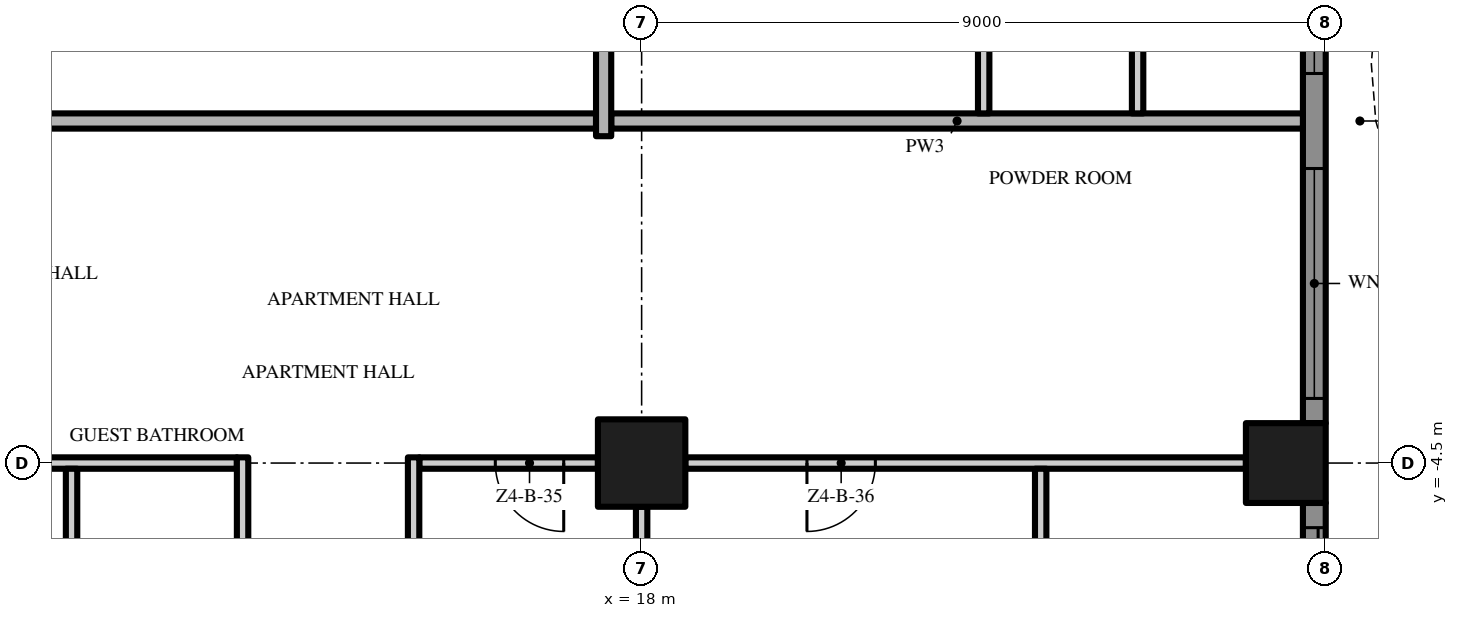
"""IFC4 building model, lengths in metres.
Left out: names, types, materials, properties, quantities, classifications, styles, units other than length and angle.
Written with IfcOpenShell. Run it as: python <this file> out.ifc"""

import sys

from ifc_helpers import new_model, si_unit, direction, frame, frame_2d, origin, origin_2d, place, context, subcontext, project, spatial, polyline, rectangle, outline, extrude, element, fill, save


model = new_model("IFC4")
c1 = context("Model", 3, precision=1e-05, world=origin(), true_north=direction((0.0, 1.0)))
c2 = subcontext(c1, "Body", "Model", "MODEL_VIEW")
j1 = project(units=[si_unit("LENGTHUNIT", "METRE"), si_unit("PLANEANGLEUNIT", "RADIAN")], contexts=[c1])
p1 = place(None, origin())
s1 = spatial("IfcSite", under=j1, at=p1, CompositionType="ELEMENT")
p2 = place(p1, origin())
s2 = spatial("IfcBuilding", under=s1, at=p2, CompositionType="ELEMENT")
p3 = place(p2, frame((0.0, 0.0, 195.8)))
s3 = spatial("IfcBuildingStorey", under=s2, at=p3, CompositionType="ELEMENT", Elevation=195.8)
p4 = place(p3, frame((18.0, -4.5, 0.0), z_axis=(0.0, 0.0, 1.0), x_axis=(1.0, 0.0, 0.0)))
e1 = element("IfcColumn", 1, at=p4, inside=s3, PredefinedType="COLUMN", context=c2, shape_type="SweptSolid", body=[
    extrude(rectangle(XDim=1.15, YDim=1.15, at=origin_2d()), origin(), (0.0, 0.0, 1.0), 3.5),
])
p5 = place(p3, frame((26.475, -4.5, 0.0), z_axis=(0.0, 0.0, 1.0), x_axis=(1.0, 0.0, 0.0)))
e2 = element("IfcColumn", 2, at=p5, inside=s3, PredefinedType="COLUMN", context=c2, shape_type="SweptSolid", body=[
    extrude(rectangle(XDim=1.05, YDim=1.05, at=origin_2d()), origin(), (0.0, 0.0, 1.0), 3.5),
])
p6 = place(p3, frame((26.85, -5.025, 0.0), z_axis=(0.0, 0.0, 1.0), x_axis=(0.0, -1.0, 0.0)))
e3 = element("IfcWall", 3, at=p6, inside=s3, PredefinedType="SOLIDWALL", context=c2, shape_type="SweptSolid", body=[
    extrude(rectangle(XDim=7.95, YDim=0.3, at=frame_2d((3.975, 0.0))), origin(), (0.0, 0.0, 1.0), 3.5),
])
p7 = place(p6, frame((4.6, 0.0, 0.45)))
e4 = element("IfcOpeningElement", 4, at=p7, cuts=e3, PredefinedType="OPENING", context=c2, shape_type="SweptSolid", body=[
    extrude(rectangle(XDim=3.025, YDim=2.65, at=frame_2d((1.512, 1.325))), frame((0.0, 0.16, 0.0), z_axis=(0.0, -1.0, 0.0), x_axis=(1.0, 0.0, 0.0)), (0.0, 0.0, 1.0), 0.32),
])
p8 = place(p6, frame((0.325, 0.0, 0.0)))
e5 = element("IfcOpeningElement", 5, at=p8, cuts=e3, PredefinedType="OPENING", context=c2, shape_type="SweptSolid", body=[
    extrude(rectangle(XDim=3.025, YDim=2.4, at=frame_2d((1.512, 1.2))), frame((0.0, 0.16, 0.0), z_axis=(0.0, -1.0, 0.0), x_axis=(1.0, 0.0, 0.0)), (0.0, 0.0, 1.0), 0.32),
])
p9 = place(p3, frame((26.85, 3.975, 0.0), z_axis=(0.0, 0.0, 1.0), x_axis=(0.0, -1.0, 0.0)))
e6 = element("IfcWall", 6, at=p9, inside=s3, PredefinedType="SOLIDWALL", context=c2, shape_type="SweptSolid", body=[
    extrude(rectangle(XDim=7.95, YDim=0.3, at=frame_2d((3.975, 0.0))), origin(), (0.0, 0.0, 1.0), 3.5),
])
p10 = place(p9, frame((4.6, 0.0, 0.45)))
e7 = element("IfcOpeningElement", 7, at=p10, cuts=e6, PredefinedType="OPENING", context=c2, shape_type="SweptSolid", body=[
    extrude(rectangle(XDim=3.025, YDim=2.65, at=frame_2d((1.512, 1.325))), frame((0.0, 0.16, 0.0), z_axis=(0.0, -1.0, 0.0), x_axis=(1.0, 0.0, 0.0)), (0.0, 0.0, 1.0), 0.32),
])
p11 = place(p9, frame((0.325, 0.0, 0.45)))
e8 = element("IfcOpeningElement", 8, at=p11, cuts=e6, PredefinedType="OPENING", context=c2, shape_type="SweptSolid", body=[
    extrude(rectangle(XDim=3.025, YDim=2.65, at=frame_2d((1.512, 1.325))), frame((0.0, 0.16, 0.0), z_axis=(0.0, -1.0, 0.0), x_axis=(1.0, 0.0, 0.0)), (0.0, 0.0, 1.0), 0.32),
])
p12 = place(p3, origin())
e9 = element("IfcWall", 9, at=p12, inside=s3, PredefinedType="USERDEFINED", context=c2, shape_type="SweptSolid", body=[
    extrude(outline(polyline([(28.8, -18.0), (28.095, -16.5), (27.659, -15.0), (27.6, -14.25), (27.659, -13.5), (28.095, -12.0), (28.8, -10.5), (29.505, -9.0), (29.941, -7.5), (30.0, -6.75), (29.941, -6.0), (29.505, -4.5), (28.8, -3.0), (28.095, -1.5), (27.659, 0.0), (27.6, 0.75), (27.659, 1.5), (28.095, 3.0), (28.8, 4.5), (29.505, 6.0), (29.941, 7.5), (30.0, 8.25), (29.941, 9.0), (29.505, 10.5), (28.8, 12.0), (28.095, 13.5), (27.659, 15.0), (27.6, 15.75), (27.659, 16.5), (28.095, 18.0), (27.855, 18.07), (27.411, 16.545), (27.349, 15.75), (27.411, 14.955), (27.86, 13.411), (28.574, 11.894), (29.271, 10.411), (29.694, 8.955), (29.749, 8.25), (29.694, 7.545), (29.271, 6.089), (28.574, 4.606), (27.86, 3.089), (27.411, 1.545), (27.349, 0.75), (27.411, -0.045), (27.86, -1.589), (28.574, -3.106), (29.271, -4.589), (29.694, -6.045), (29.749, -6.75), (29.694, -7.455), (29.271, -8.911), (28.574, -10.394), (27.86, -11.911), (27.411, -13.455), (27.349, -14.25), (27.411, -15.045), (27.86, -16.589), (28.574, -18.106), (28.8, -18.0)])), origin(), (0.0, 0.0, 1.0), 0.9),
])
p13 = place(p3, frame((9.575, -4.5, 0.0), z_axis=(0.0, 0.0, 1.0), x_axis=(1.0, 0.0, 0.0)))
e10 = element("IfcWall", 10, at=p13, inside=s3, PredefinedType="PARTITIONING", context=c2, shape_type="SweptSolid", body=[
    extrude(rectangle(XDim=3.1, YDim=0.15, at=frame_2d((1.55, 0.0))), origin(), (0.0, 0.0, 1.0), 3.5),
])
p14 = place(p3, frame((17.425, -4.5, 0.0), z_axis=(0.0, 0.0, 1.0), x_axis=(-1.0, 0.0, 0.0)))
e11 = element("IfcWall", 11, at=p14, inside=s3, PredefinedType="PARTITIONING", context=c2, shape_type="SweptSolid", body=[
    extrude(rectangle(XDim=2.35, YDim=0.15, at=frame_2d((1.175, 0.0))), origin(), (0.0, 0.0, 1.0), 3.5),
])
p15 = place(p14, frame((0.45, 0.0, 0.0)))
e12 = element("IfcOpeningElement", 12, at=p15, cuts=e11, PredefinedType="OPENING", context=c2, shape_type="SweptSolid", body=[
    extrude(rectangle(XDim=0.9, YDim=2.1, at=frame_2d((0.45, 1.05))), frame((0.0, 0.085, 0.0), z_axis=(0.0, -1.0, 0.0), x_axis=(1.0, 0.0, 0.0)), (0.0, 0.0, 1.0), 0.17),
])
p16 = place(p3, frame((25.95, -4.5, 0.0), z_axis=(0.0, 0.0, 1.0), x_axis=(-1.0, 0.0, 0.0)))
e13 = element("IfcWall", 13, at=p16, inside=s3, PredefinedType="PARTITIONING", context=c2, shape_type="SweptSolid", body=[
    extrude(rectangle(XDim=7.375, YDim=0.15, at=frame_2d((3.688, 0.0))), origin(), (0.0, 0.0, 1.0), 3.5),
])
p17 = place(p16, frame((4.875, 0.0, 0.0)))
e14 = element("IfcOpeningElement", 14, at=p17, cuts=e13, PredefinedType="OPENING", context=c2, shape_type="SweptSolid", body=[
    extrude(rectangle(XDim=0.9, YDim=2.1, at=frame_2d((0.45, 1.05))), frame((0.0, 0.085, 0.0), z_axis=(0.0, -1.0, 0.0), x_axis=(1.0, 0.0, 0.0)), (0.0, 0.0, 1.0), 0.17),
])
p18 = place(p3, frame((17.4, 0.0, 0.0), z_axis=(0.0, 0.0, 1.0), x_axis=(-1.0, 0.0, 0.0)))
e15 = element("IfcWall", 15, at=p18, inside=s3, PredefinedType="PARTITIONING", context=c2, shape_type="SweptSolid", body=[
    extrude(rectangle(XDim=17.3, YDim=0.2, at=frame_2d((8.65, 0.0))), origin(), (0.0, 0.0, 1.0), 3.5),
])
p19 = place(p18, frame((7.65, 0.0, 0.0)))
e16 = element("IfcOpeningElement", 16, at=p19, cuts=e15, PredefinedType="OPENING", context=c2, shape_type="SweptSolid", body=[
    extrude(rectangle(XDim=1.5, YDim=2.4, at=frame_2d((0.75, 1.2))), frame((0.0, 0.11, 0.0), z_axis=(0.0, -1.0, 0.0), x_axis=(1.0, 0.0, 0.0)), (0.0, 0.0, 1.0), 0.22),
])
p20 = place(p3, frame((17.6, 0.0, 0.0), z_axis=(0.0, 0.0, 1.0), x_axis=(1.0, 0.0, 0.0)))
e17 = element("IfcWall", 17, at=p20, inside=s3, PredefinedType="PARTITIONING", context=c2, shape_type="SweptSolid", body=[
    extrude(rectangle(XDim=9.1, YDim=0.2, at=frame_2d((4.55, 0.0))), origin(), (0.0, 0.0, 1.0), 3.5),
])
p21 = place(p3, frame((10.5, -8.925, 0.0), z_axis=(0.0, 0.0, 1.0), x_axis=(0.0, 1.0, 0.0)))
e18 = element("IfcWall", 18, at=p21, inside=s3, PredefinedType="PARTITIONING", context=c2, shape_type="SweptSolid", body=[
    extrude(rectangle(XDim=4.35, YDim=0.15, at=frame_2d((2.175, 0.0))), origin(), (0.0, 0.0, 1.0), 3.5),
])
p22 = place(p3, frame((12.75, -8.925, 0.0), z_axis=(0.0, 0.0, 1.0), x_axis=(0.0, 1.0, 0.0)))
e19 = element("IfcWall", 19, at=p22, inside=s3, PredefinedType="PARTITIONING", context=c2, shape_type="SweptSolid", body=[
    extrude(rectangle(XDim=4.5, YDim=0.15, at=frame_2d((2.25, 0.0))), origin(), (0.0, 0.0, 1.0), 3.5),
])
p23 = place(p22, frame((1.75, 0.0, 0.0)))
e20 = element("IfcOpeningElement", 20, at=p23, cuts=e19, PredefinedType="OPENING", context=c2, shape_type="SweptSolid", body=[
    extrude(rectangle(XDim=0.9, YDim=2.1, at=frame_2d((0.45, 1.05))), frame((0.0, 0.085, 0.0), z_axis=(0.0, -1.0, 0.0), x_axis=(1.0, 0.0, 0.0)), (0.0, 0.0, 1.0), 0.17),
])
p24 = place(p3, frame((15.0, -9.075, 0.0), z_axis=(0.0, 0.0, 1.0), x_axis=(0.0, 1.0, 0.0)))
e21 = element("IfcWall", 21, at=p24, inside=s3, PredefinedType="PARTITIONING", context=c2, shape_type="SweptSolid", body=[
    extrude(rectangle(XDim=4.65, YDim=0.15, at=frame_2d((2.325, 0.0))), origin(), (0.0, 0.0, 1.0), 3.5),
])
p25 = place(p3, frame((17.5, -0.2, 0.0), z_axis=(0.0, 0.0, 1.0), x_axis=(0.0, 1.0, 0.0)))
e22 = element("IfcWall", 22, at=p25, inside=s3, PredefinedType="PARTITIONING", context=c2, shape_type="SweptSolid", body=[
    extrude(rectangle(XDim=4.125, YDim=0.2, at=frame_2d((2.062, 0.0))), origin(), (0.0, 0.0, 1.0), 3.5),
])
p26 = place(p3, frame((18.0, -8.925, 0.0), z_axis=(0.0, 0.0, 1.0), x_axis=(0.0, 1.0, 0.0)))
e23 = element("IfcWall", 23, at=p26, inside=s3, PredefinedType="PARTITIONING", context=c2, shape_type="SweptSolid", body=[
    extrude(rectangle(XDim=3.85, YDim=0.15, at=frame_2d((1.925, 0.0))), origin(), (0.0, 0.0, 1.0), 3.5),
])
p27 = place(p3, frame((22.5, 17.475, 0.0), z_axis=(0.0, 0.0, 1.0), x_axis=(0.0, -1.0, 0.0)))
e24 = element("IfcWall", 24, at=p27, inside=s3, PredefinedType="PARTITIONING", context=c2, shape_type="SweptSolid", body=[
    extrude(rectangle(XDim=17.375, YDim=0.15, at=frame_2d((8.688, 0.0))), origin(), (0.0, 0.0, 1.0), 3.5),
])
p28 = place(p27, frame((13.175, 0.0, 0.0)))
e25 = element("IfcOpeningElement", 25, at=p28, cuts=e24, PredefinedType="OPENING", context=c2, shape_type="SweptSolid", body=[
    extrude(rectangle(XDim=1.8, YDim=2.4, at=frame_2d((0.9, 1.2))), frame((0.0, 0.085, 0.0), z_axis=(0.0, -1.0, 0.0), x_axis=(1.0, 0.0, 0.0)), (0.0, 0.0, 1.0), 0.17),
])
p29 = place(p27, frame((5.725, 0.0, 0.0)))
e26 = element("IfcOpeningElement", 26, at=p29, cuts=e24, PredefinedType="OPENING", context=c2, shape_type="SweptSolid", body=[
    extrude(rectangle(XDim=1.0, YDim=2.4, at=frame_2d((0.5, 1.2))), frame((0.0, 0.085, 0.0), z_axis=(0.0, -1.0, 0.0), x_axis=(1.0, 0.0, 0.0)), (0.0, 0.0, 1.0), 0.17),
])
p30 = place(p3, frame((23.25, -4.575, 0.0), z_axis=(0.0, 0.0, 1.0), x_axis=(0.0, -1.0, 0.0)))
e27 = element("IfcWall", 27, at=p30, inside=s3, PredefinedType="PARTITIONING", context=c2, shape_type="SweptSolid", body=[
    extrude(rectangle(XDim=4.35, YDim=0.15, at=frame_2d((2.175, 0.0))), origin(), (0.0, 0.0, 1.0), 3.5),
])
p31 = place(p30, frame((1.7, 0.0, 0.0)))
e28 = element("IfcOpeningElement", 28, at=p31, cuts=e27, PredefinedType="OPENING", context=c2, shape_type="SweptSolid", body=[
    extrude(rectangle(XDim=0.9, YDim=2.1, at=frame_2d((0.45, 1.05))), frame((0.0, 0.085, 0.0), z_axis=(0.0, -1.0, 0.0), x_axis=(1.0, 0.0, 0.0)), (0.0, 0.0, 1.0), 0.17),
])
p32 = place(p3, frame((24.525, 0.1, 0.0), z_axis=(0.0, 0.0, 1.0), x_axis=(0.0, 1.0, 0.0)))
e29 = element("IfcWall", 29, at=p32, inside=s3, PredefinedType="PARTITIONING", context=c2, shape_type="SweptSolid", body=[
    extrude(rectangle(XDim=2.225, YDim=0.15, at=frame_2d((1.113, 0.0))), origin(), (0.0, 0.0, 1.0), 3.5),
])
p33 = place(p8, origin())
e30 = element("IfcDoor", 30, at=p33, inside=s3, OperationType="SINGLE_SWING_LEFT", PredefinedType="DOOR", context=c2, shape_type="SweptSolid", body=[
    extrude(rectangle(XDim=3.025, YDim=2.4, at=frame_2d((1.512, 1.2))), frame((0.0, 0.025, 0.0), z_axis=(0.0, -1.0, 0.0), x_axis=(1.0, 0.0, 0.0)), (0.0, 0.0, 1.0), 0.05),
])
fill(e5, e30)
p34 = place(p10, origin())
e31 = element("IfcWindow", 31, at=p34, inside=s3, PartitioningType="SINGLE_PANEL", PredefinedType="WINDOW", context=c2, shape_type="SweptSolid", body=[
    extrude(rectangle(XDim=3.025, YDim=2.65, at=frame_2d((1.512, 1.325))), frame((0.0, 0.03, 0.0), z_axis=(0.0, -1.0, 0.0), x_axis=(1.0, 0.0, 0.0)), (0.0, 0.0, 1.0), 0.06),
])
fill(e7, e31)
p35 = place(p11, origin())
e32 = element("IfcWindow", 32, at=p35, inside=s3, PartitioningType="SINGLE_PANEL", PredefinedType="WINDOW", context=c2, shape_type="SweptSolid", body=[
    extrude(rectangle(XDim=3.025, YDim=2.65, at=frame_2d((1.512, 1.325))), frame((0.0, 0.03, 0.0), z_axis=(0.0, -1.0, 0.0), x_axis=(1.0, 0.0, 0.0)), (0.0, 0.0, 1.0), 0.06),
])
fill(e8, e32)
p36 = place(p15, origin())
e33 = element("IfcDoor", 33, at=p36, inside=s3, OperationType="SINGLE_SWING_LEFT", PredefinedType="DOOR", context=c2, shape_type="SweptSolid", body=[
    extrude(rectangle(XDim=0.9, YDim=2.1, at=frame_2d((0.45, 1.05))), frame((0.0, 0.025, 0.0), z_axis=(0.0, -1.0, 0.0), x_axis=(1.0, 0.0, 0.0)), (0.0, 0.0, 1.0), 0.05),
])
fill(e12, e33)
p37 = place(p17, origin())
e34 = element("IfcDoor", 34, at=p37, inside=s3, OperationType="SINGLE_SWING_RIGHT", PredefinedType="DOOR", context=c2, shape_type="SweptSolid", body=[
    extrude(rectangle(XDim=0.9, YDim=2.1, at=frame_2d((0.45, 1.05))), frame((0.0, 0.025, 0.0), z_axis=(0.0, -1.0, 0.0), x_axis=(1.0, 0.0, 0.0)), (0.0, 0.0, 1.0), 0.05),
])
fill(e14, e34)
save(model, sys.argv[1])
